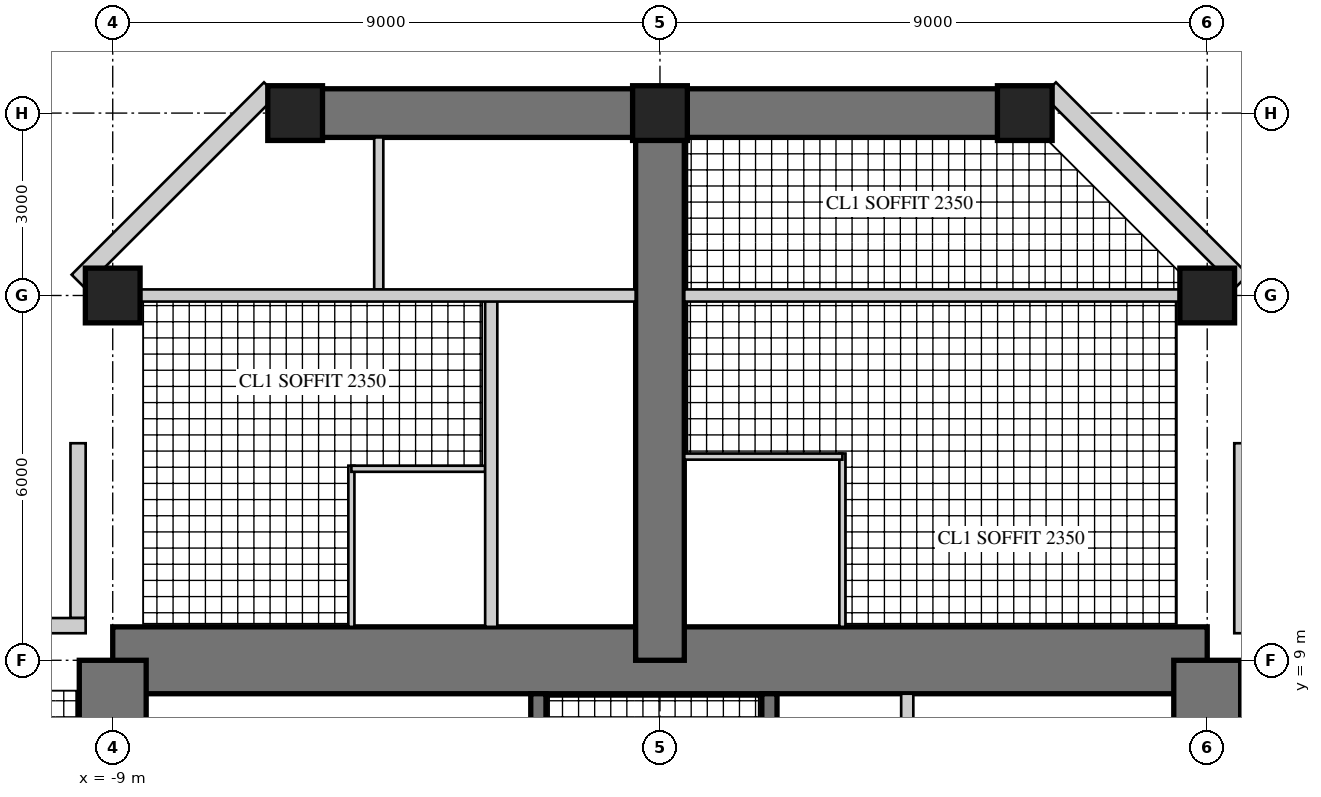
"""IFC4 building model, lengths in metres.
Left out: names, types, materials, properties, quantities, classifications, styles, units other than length and angle.
Written with IfcOpenShell. Run it as: python <this file> out.ifc"""

import sys

from ifc_helpers import new_model, si_unit, direction, frame, frame_2d, origin, origin_2d, place, context, subcontext, project, spatial, rectangle, hollow_rectangle, extrude, element, fill, save


model = new_model("IFC4")
c1 = context("Model", 3, precision=1e-05, world=origin(), true_north=direction((0.0, 1.0)))
c2 = subcontext(c1, "Body", "Model", "MODEL_VIEW")
j1 = project(units=[si_unit("LENGTHUNIT", "METRE"), si_unit("PLANEANGLEUNIT", "RADIAN")], contexts=[c1])
p1 = place(None, origin())
s1 = spatial("IfcSite", under=j1, at=p1, CompositionType="ELEMENT")
p2 = place(p1, origin())
s2 = spatial("IfcBuilding", under=s1, at=p2, CompositionType="ELEMENT")
p3 = place(p2, frame((0.0, 0.0, 172.9)))
s3 = spatial("IfcBuildingStorey", under=s2, at=p3, CompositionType="ELEMENT", Elevation=172.9)
p4 = place(p3, frame((9.0, 9.0, 0.0), z_axis=(0.0, 0.0, 1.0), x_axis=(-1.0, 0.0, 0.0)))
e1 = element("IfcWall", 1, at=p4, inside=s3, PredefinedType="SHEAR", context=c2, shape_type="SweptSolid", body=[
    extrude(rectangle(XDim=18.0, YDim=1.1, at=frame_2d((9.0, 0.0))), origin(), (0.0, 0.0, 1.0), 3.4),
])
p5 = place(p4, frame((9.8, 0.0, 0.0)))
e2 = element("IfcOpeningElement", 2, at=p5, cuts=e1, PredefinedType="OPENING", context=c2, shape_type="SweptSolid", body=[
    extrude(rectangle(XDim=1.0, YDim=2.4, at=frame_2d((0.5, 1.2))), frame((0.0, 0.56, 0.0), z_axis=(0.0, -1.0, 0.0), x_axis=(1.0, 0.0, 0.0)), (0.0, 0.0, 1.0), 1.12),
])
p6 = place(p3, frame((9.0, -9.0, 0.0), z_axis=(0.0, 0.0, 1.0), x_axis=(0.0, 1.0, 0.0)))
e3 = element("IfcWall", 3, at=p6, inside=s3, PredefinedType="SHEAR", context=c2, shape_type="SweptSolid", body=[
    extrude(rectangle(XDim=18.0, YDim=1.1, at=frame_2d((9.0, 0.0))), origin(), (0.0, 0.0, 1.0), 3.4),
])
p7 = place(p6, frame((9.8, 0.0, 0.0)))
e4 = element("IfcOpeningElement", 4, at=p7, cuts=e3, PredefinedType="OPENING", context=c2, shape_type="SweptSolid", body=[
    extrude(rectangle(XDim=1.0, YDim=2.4, at=frame_2d((0.5, 1.2))), frame((0.0, 0.56, 0.0), z_axis=(0.0, -1.0, 0.0), x_axis=(1.0, 0.0, 0.0)), (0.0, 0.0, 1.0), 1.12),
])
p8 = place(p3, frame((-9.0, 9.0, 0.0), z_axis=(0.0, 0.0, 1.0), x_axis=(0.0, -1.0, 0.0)))
e5 = element("IfcWall", 5, at=p8, inside=s3, PredefinedType="SHEAR", context=c2, shape_type="SweptSolid", body=[
    extrude(rectangle(XDim=18.0, YDim=1.1, at=frame_2d((9.0, 0.0))), origin(), (0.0, 0.0, 1.0), 3.4),
])
p9 = place(p8, frame((9.8, 0.0, 0.0)))
e6 = element("IfcOpeningElement", 6, at=p9, cuts=e5, PredefinedType="OPENING", context=c2, shape_type="SweptSolid", body=[
    extrude(rectangle(XDim=1.0, YDim=2.4, at=frame_2d((0.5, 1.2))), frame((0.0, 0.56, 0.0), z_axis=(0.0, -1.0, 0.0), x_axis=(1.0, 0.0, 0.0)), (0.0, 0.0, 1.0), 1.12),
])
p10 = place(p3, frame((1.8, 1.875, 0.0), z_axis=(0.0, 0.0, 1.0), x_axis=(0.0, 1.0, 0.0)))
e7 = element("IfcWall", 7, at=p10, inside=s3, PredefinedType="SHEAR", context=c2, shape_type="SweptSolid", body=[
    extrude(rectangle(XDim=6.575, YDim=0.25, at=frame_2d((3.288, 0.0))), origin(), (0.0, 0.0, 1.0), 3.4),
])
p11 = place(p10, frame((1.875, 0.0, 0.0)))
e8 = element("IfcOpeningElement", 8, at=p11, cuts=e7, PredefinedType="OPENING", context=c2, shape_type="SweptSolid", body=[
    extrude(rectangle(XDim=1.6, YDim=2.4, at=frame_2d((0.8, 1.2))), frame((0.0, 0.135, 0.0), z_axis=(0.0, -1.0, 0.0), x_axis=(1.0, 0.0, 0.0)), (0.0, 0.0, 1.0), 0.27),
])
p12 = place(p3, frame((4.067, 5.975, 0.0), z_axis=(0.0, 0.0, 1.0), x_axis=(0.0, 1.0, 0.0)))
e9 = element("IfcWall", 9, at=p12, inside=s3, PredefinedType="PARTITIONING", context=c2, shape_type="SweptSolid", body=[
    extrude(rectangle(XDim=2.475, YDim=0.2, at=frame_2d((1.237, 0.0))), origin(), (0.0, 0.0, 1.0), 3.4),
])
p13 = place(p3, frame((-2.0, 1.675, 0.0), z_axis=(0.0, 0.0, 1.0), x_axis=(0.0, 1.0, 0.0)))
e10 = element("IfcWall", 10, at=p13, inside=s3, PredefinedType="SHEAR", context=c2, shape_type="SweptSolid", body=[
    extrude(rectangle(XDim=6.775, YDim=0.25, at=frame_2d((3.387, 0.0))), origin(), (0.0, 0.0, 1.0), 3.4),
])
p14 = place(p13, frame((0.725, 0.0, 0.0)))
e11 = element("IfcOpeningElement", 11, at=p14, cuts=e10, PredefinedType="OPENING", context=c2, shape_type="SweptSolid", body=[
    extrude(rectangle(XDim=1.0, YDim=2.1, at=frame_2d((0.5, 1.05))), frame((0.0, 0.135, 0.0), z_axis=(0.0, -1.0, 0.0), x_axis=(1.0, 0.0, 0.0)), (0.0, 0.0, 1.0), 0.27),
])
p15 = place(p3, frame((0.0, 9.0, 0.0), z_axis=(0.0, 0.0, 1.0), x_axis=(0.0, 1.0, 0.0)))
e12 = element("IfcWall", 12, at=p15, inside=s3, PredefinedType="SHEAR", context=c2, shape_type="SweptSolid", body=[
    extrude(rectangle(XDim=9.0, YDim=0.8, at=frame_2d((4.5, 0.0))), origin(), (0.0, 0.0, 1.0), 3.4),
])
p16 = place(p15, frame((3.95, 0.0, 0.0)))
e13 = element("IfcOpeningElement", 13, at=p16, cuts=e12, PredefinedType="OPENING", context=c2, shape_type="SweptSolid", body=[
    extrude(rectangle(XDim=1.0, YDim=2.15, at=frame_2d((0.5, 1.075))), frame((0.0, 0.41, 0.0), z_axis=(0.0, -1.0, 0.0), x_axis=(1.0, 0.0, 0.0)), (0.0, 0.0, 1.0), 0.82),
])
p17 = place(p15, frame((7.0, 0.0, 0.0)))
e14 = element("IfcOpeningElement", 14, at=p17, cuts=e12, PredefinedType="OPENING", context=c2, shape_type="SweptSolid", body=[
    extrude(rectangle(XDim=1.0, YDim=2.2, at=frame_2d((0.5, 1.1))), frame((0.0, 0.41, 0.0), z_axis=(0.0, -1.0, 0.0), x_axis=(1.0, 0.0, 0.0)), (0.0, 0.0, 1.0), 0.82),
])
p18 = place(p3, frame((6.0, 18.0, 0.0), z_axis=(0.0, 0.0, 1.0), x_axis=(-1.0, 0.0, 0.0)))
e15 = element("IfcWall", 15, at=p18, inside=s3, PredefinedType="SHEAR", context=c2, shape_type="SweptSolid", body=[
    extrude(rectangle(XDim=12.0, YDim=0.8, at=frame_2d((6.0, 0.0))), origin(), (0.0, 0.0, 1.0), 3.4),
])
p19 = place(p18, frame((1.625, 0.0, 0.6)))
e16 = element("IfcOpeningElement", 16, at=p19, cuts=e15, PredefinedType="OPENING", context=c2, shape_type="SweptSolid", body=[
    extrude(rectangle(XDim=3.0, YDim=2.4, at=frame_2d((1.5, 1.2))), frame((0.0, 0.41, 0.0), z_axis=(0.0, -1.0, 0.0), x_axis=(1.0, 0.0, 0.0)), (0.0, 0.0, 1.0), 0.82),
])
p20 = place(p18, frame((7.375, 0.0, 0.6)))
e17 = element("IfcOpeningElement", 17, at=p20, cuts=e15, PredefinedType="OPENING", context=c2, shape_type="SweptSolid", body=[
    extrude(rectangle(XDim=3.0, YDim=2.4, at=frame_2d((1.5, 1.2))), frame((0.0, 0.41, 0.0), z_axis=(0.0, -1.0, 0.0), x_axis=(1.0, 0.0, 0.0)), (0.0, 0.0, 1.0), 0.82),
])
for number, where, z_axis, x_axis in (
    (18, (9.0, 15.0, 0.0), (0.0, 0.0, 1.0), (1.0, 0.0, 0.0)),
    (19, (-9.0, 15.0, 0.0), (0.0, 0.0, 1.0), (1.0, 0.0, 0.0)),
    (20, (6.0, 18.0, 0.0), (0.0, 0.0, 1.0), (1.0, 0.0, 0.0)),
    (21, (0.0, 18.0, 0.0), (0.0, 0.0, 1.0), (1.0, 0.0, 0.0)),
    (22, (-6.0, 18.0, 0.0), (0.0, 0.0, 1.0), (1.0, 0.0, 0.0)),
):
    element("IfcColumn", number, at=place(p3, frame(where, z_axis=z_axis, x_axis=x_axis)), inside=s3, PredefinedType="COLUMN", context=c2, shape_type="SweptSolid", body=[
        extrude(rectangle(XDim=0.9, YDim=0.9, at=origin_2d()), origin(), (0.0, 0.0, 1.0), 3.4),
    ])
p21 = place(p3, frame((9.57, 9.445, 0.0), z_axis=(0.0, 0.0, 1.0), x_axis=(0.0, 1.0, 0.0)))
e23 = element("IfcWall", 23, at=p21, inside=s3, PredefinedType="SOLIDWALL", context=c2, shape_type="SweptSolid", body=[
    extrude(rectangle(XDim=3.125, YDim=0.25, at=frame_2d((1.562, 0.0))), origin(), (0.0, 0.0, 1.0), 3.22),
])
p22 = place(p21, frame((0.6, 0.0, 0.0)))
e24 = element("IfcOpeningElement", 24, at=p22, cuts=e23, PredefinedType="OPENING", context=c2, shape_type="SweptSolid", body=[
    extrude(rectangle(XDim=1.0, YDim=2.2, at=frame_2d((0.5, 1.1))), frame((0.0, 0.135, 0.0), z_axis=(0.0, -1.0, 0.0), x_axis=(1.0, 0.0, 0.0)), (0.0, 0.0, 1.0), 0.27),
])
p23 = place(p3, frame((9.57, 15.236, 0.0), z_axis=(0.0, 0.0, 1.0), x_axis=(-0.707134062067, 0.707079499254, 0.0)))
e25 = element("IfcWall", 25, at=p23, inside=s3, PredefinedType="SOLIDWALL", context=c2, shape_type="SweptSolid", body=[
    extrude(rectangle(XDim=4.475, YDim=0.3, at=frame_2d((2.237, 0.0))), origin(), (0.0, 0.0, 1.0), 3.22),
])
p24 = place(p23, frame((1.787, 0.0, 0.3)))
e26 = element("IfcOpeningElement", 26, at=p24, cuts=e25, PredefinedType="OPENING", context=c2, shape_type="SweptSolid", body=[
    extrude(rectangle(XDim=0.9, YDim=2.4, at=frame_2d((0.45, 1.2))), frame((0.0, 0.16, 0.0), z_axis=(0.0, -1.0, 0.0), x_axis=(1.0, 0.0, 0.0)), (0.0, 0.0, 1.0), 0.32),
])
p25 = place(p3, frame((-6.406, 18.4, 0.0), z_axis=(0.0, 0.0, 1.0), x_axis=(-0.707134062067, -0.707079499254, 0.0)))
e27 = element("IfcWall", 27, at=p25, inside=s3, PredefinedType="SOLIDWALL", context=c2, shape_type="SweptSolid", body=[
    extrude(rectangle(XDim=4.475, YDim=0.3, at=frame_2d((2.237, 0.0))), origin(), (0.0, 0.0, 1.0), 3.22),
])
p26 = place(p25, frame((1.787, 0.0, 0.3)))
e28 = element("IfcOpeningElement", 28, at=p26, cuts=e27, PredefinedType="OPENING", context=c2, shape_type="SweptSolid", body=[
    extrude(rectangle(XDim=0.9, YDim=2.4, at=frame_2d((0.45, 1.2))), frame((0.0, 0.16, 0.0), z_axis=(0.0, -1.0, 0.0), x_axis=(1.0, 0.0, 0.0)), (0.0, 0.0, 1.0), 0.32),
])
p27 = place(p3, frame((-9.57, 12.57, 0.0), z_axis=(0.0, 0.0, 1.0), x_axis=(0.0, -1.0, 0.0)))
e29 = element("IfcWall", 29, at=p27, inside=s3, PredefinedType="SOLIDWALL", context=c2, shape_type="SweptSolid", body=[
    extrude(rectangle(XDim=2.875, YDim=0.25, at=frame_2d((1.438, 0.0))), origin(), (0.0, 0.0, 1.0), 3.22),
])
p28 = place(p27, frame((0.6, 0.0, 0.0)))
e30 = element("IfcOpeningElement", 30, at=p28, cuts=e29, PredefinedType="OPENING", context=c2, shape_type="SweptSolid", body=[
    extrude(rectangle(XDim=1.0, YDim=2.2, at=frame_2d((0.5, 1.1))), frame((0.0, 0.135, 0.0), z_axis=(0.0, -1.0, 0.0), x_axis=(1.0, 0.0, 0.0)), (0.0, 0.0, 1.0), 0.27),
])
p29 = place(p3, frame((-9.445, 9.57, 0.0), z_axis=(0.0, 0.0, 1.0), x_axis=(-1.0, 0.0, 0.0)))
e31 = element("IfcWall", 31, at=p29, inside=s3, PredefinedType="SOLIDWALL", context=c2, shape_type="SweptSolid", body=[
    extrude(rectangle(XDim=3.125, YDim=0.25, at=frame_2d((1.562, 0.0))), origin(), (0.0, 0.0, 1.0), 3.22),
])
p30 = place(p29, frame((0.6, 0.0, 0.0)))
e32 = element("IfcOpeningElement", 32, at=p30, cuts=e31, PredefinedType="OPENING", context=c2, shape_type="SweptSolid", body=[
    extrude(rectangle(XDim=1.0, YDim=2.2, at=frame_2d((0.5, 1.1))), frame((0.0, 0.135, 0.0), z_axis=(0.0, -1.0, 0.0), x_axis=(1.0, 0.0, 0.0)), (0.0, 0.0, 1.0), 0.27),
])
p31 = place(p3, frame((-5.075, 9.55, 0.0), z_axis=(0.0, 0.0, 1.0), x_axis=(0.0, 1.0, 0.0)))
e33 = element("IfcWall", 33, at=p31, inside=s3, PredefinedType="PARTITIONING", context=c2, shape_type="SweptSolid", body=[
    extrude(rectangle(XDim=2.65, YDim=0.1, at=frame_2d((1.325, 0.0))), origin(), (0.0, 0.0, 1.0), 3.22),
])
p32 = place(p3, frame((-2.875, 12.15, 0.0), z_axis=(0.0, 0.0, 1.0), x_axis=(-1.0, 0.0, 0.0)))
e34 = element("IfcWall", 34, at=p32, inside=s3, PredefinedType="PARTITIONING", context=c2, shape_type="SweptSolid", body=[
    extrude(rectangle(XDim=2.2, YDim=0.1, at=frame_2d((1.1, 0.0))), origin(), (0.0, 0.0, 1.0), 3.22),
])
p33 = place(p32, frame((0.55, 0.0, 0.0)))
e35 = element("IfcOpeningElement", 35, at=p33, cuts=e34, PredefinedType="OPENING", context=c2, shape_type="SweptSolid", body=[
    extrude(rectangle(XDim=0.9, YDim=2.1, at=frame_2d((0.45, 1.05))), frame((0.0, 0.06, 0.0), z_axis=(0.0, -1.0, 0.0), x_axis=(1.0, 0.0, 0.0)), (0.0, 0.0, 1.0), 0.12),
])
p34 = place(p3, frame((3.0, 9.55, 0.0), z_axis=(0.0, 0.0, 1.0), x_axis=(0.0, 1.0, 0.0)))
e36 = element("IfcWall", 36, at=p34, inside=s3, PredefinedType="PARTITIONING", context=c2, shape_type="SweptSolid", body=[
    extrude(rectangle(XDim=2.85, YDim=0.1, at=frame_2d((1.425, 0.0))), origin(), (0.0, 0.0, 1.0), 3.22),
])
p35 = place(p3, frame((3.0, 12.35, 0.0), z_axis=(0.0, 0.0, 1.0), x_axis=(-1.0, 0.0, 0.0)))
e37 = element("IfcWall", 37, at=p35, inside=s3, PredefinedType="PARTITIONING", context=c2, shape_type="SweptSolid", body=[
    extrude(rectangle(XDim=2.6, YDim=0.1, at=frame_2d((1.3, 0.0))), origin(), (0.0, 0.0, 1.0), 3.22),
])
p36 = place(p35, frame((0.55, 0.0, 0.0)))
e38 = element("IfcOpeningElement", 38, at=p36, cuts=e37, PredefinedType="OPENING", context=c2, shape_type="SweptSolid", body=[
    extrude(rectangle(XDim=0.9, YDim=2.1, at=frame_2d((0.45, 1.05))), frame((0.0, 0.06, 0.0), z_axis=(0.0, -1.0, 0.0), x_axis=(1.0, 0.0, 0.0)), (0.0, 0.0, 1.0), 0.12),
])
p37 = place(p3, frame((-2.775, 9.55, 0.0), z_axis=(0.0, 0.0, 1.0), x_axis=(0.0, 1.0, 0.0)))
e39 = element("IfcWall", 39, at=p37, inside=s3, PredefinedType="SOLIDWALL", context=c2, shape_type="SweptSolid", body=[
    extrude(rectangle(XDim=5.45, YDim=0.2, at=frame_2d((2.725, 0.0))), origin(), (0.0, 0.0, 1.0), 3.22),
])
p38 = place(p37, frame((3.4, 0.0, 0.0)))
e40 = element("IfcOpeningElement", 40, at=p38, cuts=e39, PredefinedType="OPENING", context=c2, shape_type="SweptSolid", body=[
    extrude(rectangle(XDim=1.0, YDim=2.15, at=frame_2d((0.5, 1.075))), frame((0.0, 0.11, 0.0), z_axis=(0.0, -1.0, 0.0), x_axis=(1.0, 0.0, 0.0)), (0.0, 0.0, 1.0), 0.22),
])
p39 = place(p3, frame((-4.625, 15.1, 0.0), z_axis=(0.0, 0.0, 1.0), x_axis=(0.0, 1.0, 0.0)))
e41 = element("IfcWall", 41, at=p39, inside=s3, PredefinedType="PARTITIONING", context=c2, shape_type="SweptSolid", body=[
    extrude(rectangle(XDim=2.5, YDim=0.15, at=frame_2d((1.25, 0.0))), origin(), (0.0, 0.0, 1.0), 3.22),
])
p40 = place(p39, frame((0.6, 0.0, 0.0)))
e42 = element("IfcOpeningElement", 42, at=p40, cuts=e41, PredefinedType="OPENING", context=c2, shape_type="SweptSolid", body=[
    extrude(rectangle(XDim=1.0, YDim=2.1, at=frame_2d((0.5, 1.05))), frame((0.0, 0.085, 0.0), z_axis=(0.0, -1.0, 0.0), x_axis=(1.0, 0.0, 0.0)), (0.0, 0.0, 1.0), 0.17),
])
p41 = place(p3, frame((8.55, 15.0, 0.0), z_axis=(0.0, 0.0, 1.0), x_axis=(-1.0, 0.0, 0.0)))
e43 = element("IfcWall", 43, at=p41, inside=s3, PredefinedType="SOLIDWALL", context=c2, shape_type="SweptSolid", body=[
    extrude(rectangle(XDim=8.15, YDim=0.2, at=frame_2d((4.075, 0.0))), origin(), (0.0, 0.0, 1.0), 2.47),
])
p42 = place(p3, frame((-0.4, 15.0, 0.0), z_axis=(0.0, 0.0, 1.0), x_axis=(-1.0, 0.0, 0.0)))
e44 = element("IfcWall", 44, at=p42, inside=s3, PredefinedType="SOLIDWALL", context=c2, shape_type="SweptSolid", body=[
    extrude(rectangle(XDim=8.15, YDim=0.2, at=frame_2d((4.075, 0.0))), origin(), (0.0, 0.0, 1.0), 2.47),
])
p43 = place(p42, frame((0.4, 0.0, 0.0)))
e45 = element("IfcOpeningElement", 45, at=p43, cuts=e44, PredefinedType="OPENING", context=c2, shape_type="SweptSolid", body=[
    extrude(rectangle(XDim=1.0, YDim=2.2, at=frame_2d((0.5, 1.1))), frame((0.0, 0.11, 0.0), z_axis=(0.0, -1.0, 0.0), x_axis=(1.0, 0.0, 0.0)), (0.0, 0.0, 1.0), 0.22),
])
p44 = place(p22, origin())
e46 = element("IfcDoor", 46, at=p44, inside=s3, OperationType="SINGLE_SWING_LEFT", PredefinedType="DOOR", context=c2, shape_type="SweptSolid", body=[
    extrude(hollow_rectangle(XDim=1.0, YDim=2.2, WallThickness=0.06, at=frame_2d((0.5, 1.1))), frame((0.0, 0.025, 0.0), z_axis=(0.0, -1.0, 0.0), x_axis=(1.0, 0.0, 0.0)), (0.0, 0.0, 1.0), 0.05),
    extrude(rectangle(XDim=0.879, YDim=2.079, at=frame_2d((0.5, 1.1))), frame((0.0, 0.025, 0.0), z_axis=(0.0, -1.0, 0.0), x_axis=(1.0, 0.0, 0.0)), (0.0, 0.0, 1.0), 0.05),
])
fill(e24, e46)
p45 = place(p24, origin())
e47 = element("IfcWindow", 47, at=p45, inside=s3, PartitioningType="SINGLE_PANEL", PredefinedType="WINDOW", context=c2, shape_type="SweptSolid", body=[
    extrude(hollow_rectangle(XDim=0.9, YDim=2.4, WallThickness=0.06, at=frame_2d((0.45, 1.2))), frame((0.0, 0.03, 0.0), z_axis=(0.0, -1.0, 0.0), x_axis=(1.0, 0.0, 0.0)), (0.0, 0.0, 1.0), 0.06),
    extrude(rectangle(XDim=0.779, YDim=2.279, at=frame_2d((0.45, 1.2))), frame((0.0, 0.03, 0.0), z_axis=(0.0, -1.0, 0.0), x_axis=(1.0, 0.0, 0.0)), (0.0, 0.0, 1.0), 0.06),
])
fill(e26, e47)
p46 = place(p19, origin())
e48 = element("IfcWindow", 48, at=p46, inside=s3, PartitioningType="SINGLE_PANEL", PredefinedType="WINDOW", context=c2, shape_type="SweptSolid", body=[
    extrude(hollow_rectangle(XDim=3.0, YDim=2.4, WallThickness=0.06, at=frame_2d((1.5, 1.2))), frame((0.0, 0.03, 0.0), z_axis=(0.0, -1.0, 0.0), x_axis=(1.0, 0.0, 0.0)), (0.0, 0.0, 1.0), 0.06),
    extrude(rectangle(XDim=2.879, YDim=2.279, at=frame_2d((1.5, 1.2))), frame((0.0, 0.03, 0.0), z_axis=(0.0, -1.0, 0.0), x_axis=(1.0, 0.0, 0.0)), (0.0, 0.0, 1.0), 0.06),
])
fill(e16, e48)
p47 = place(p20, origin())
e49 = element("IfcWindow", 49, at=p47, inside=s3, PartitioningType="SINGLE_PANEL", PredefinedType="WINDOW", context=c2, shape_type="SweptSolid", body=[
    extrude(hollow_rectangle(XDim=3.0, YDim=2.4, WallThickness=0.06, at=frame_2d((1.5, 1.2))), frame((0.0, 0.03, 0.0), z_axis=(0.0, -1.0, 0.0), x_axis=(1.0, 0.0, 0.0)), (0.0, 0.0, 1.0), 0.06),
    extrude(rectangle(XDim=2.879, YDim=2.279, at=frame_2d((1.5, 1.2))), frame((0.0, 0.03, 0.0), z_axis=(0.0, -1.0, 0.0), x_axis=(1.0, 0.0, 0.0)), (0.0, 0.0, 1.0), 0.06),
])
fill(e17, e49)
p48 = place(p26, origin())
e50 = element("IfcWindow", 50, at=p48, inside=s3, PartitioningType="SINGLE_PANEL", PredefinedType="WINDOW", context=c2, shape_type="SweptSolid", body=[
    extrude(hollow_rectangle(XDim=0.9, YDim=2.4, WallThickness=0.06, at=frame_2d((0.45, 1.2))), frame((0.0, 0.03, 0.0), z_axis=(0.0, -1.0, 0.0), x_axis=(1.0, 0.0, 0.0)), (0.0, 0.0, 1.0), 0.06),
    extrude(rectangle(XDim=0.779, YDim=2.279, at=frame_2d((0.45, 1.2))), frame((0.0, 0.03, 0.0), z_axis=(0.0, -1.0, 0.0), x_axis=(1.0, 0.0, 0.0)), (0.0, 0.0, 1.0), 0.06),
])
fill(e28, e50)
p49 = place(p28, origin())
e51 = element("IfcDoor", 51, at=p49, inside=s3, OperationType="SINGLE_SWING_RIGHT", PredefinedType="DOOR", context=c2, shape_type="SweptSolid", body=[
    extrude(hollow_rectangle(XDim=1.0, YDim=2.2, WallThickness=0.06, at=frame_2d((0.5, 1.1))), frame((0.0, 0.025, 0.0), z_axis=(0.0, -1.0, 0.0), x_axis=(1.0, 0.0, 0.0)), (0.0, 0.0, 1.0), 0.05),
    extrude(rectangle(XDim=0.879, YDim=2.079, at=frame_2d((0.5, 1.1))), frame((0.0, 0.025, 0.0), z_axis=(0.0, -1.0, 0.0), x_axis=(1.0, 0.0, 0.0)), (0.0, 0.0, 1.0), 0.05),
])
fill(e30, e51)
p50 = place(p33, origin())
e52 = element("IfcDoor", 52, at=p50, inside=s3, OperationType="SINGLE_SWING_LEFT", PredefinedType="DOOR", context=c2, shape_type="SweptSolid", body=[
    extrude(rectangle(XDim=0.9, YDim=2.1, at=frame_2d((0.45, 1.05))), frame((0.0, 0.025, 0.0), z_axis=(0.0, -1.0, 0.0), x_axis=(1.0, 0.0, 0.0)), (0.0, 0.0, 1.0), 0.05),
])
fill(e35, e52)
p51 = place(p36, origin())
e53 = element("IfcDoor", 53, at=p51, inside=s3, OperationType="SINGLE_SWING_LEFT", PredefinedType="DOOR", context=c2, shape_type="SweptSolid", body=[
    extrude(rectangle(XDim=0.9, YDim=2.1, at=frame_2d((0.45, 1.05))), frame((0.0, 0.025, 0.0), z_axis=(0.0, -1.0, 0.0), x_axis=(1.0, 0.0, 0.0)), (0.0, 0.0, 1.0), 0.05),
])
fill(e38, e53)
p52 = place(p38, origin())
e54 = element("IfcDoor", 54, at=p52, inside=s3, OperationType="SINGLE_SWING_LEFT", PredefinedType="DOOR", context=c2, shape_type="SweptSolid", body=[
    extrude(rectangle(XDim=1.0, YDim=2.15, at=frame_2d((0.5, 1.075))), frame((0.0, 0.025, 0.0), z_axis=(0.0, -1.0, 0.0), x_axis=(1.0, 0.0, 0.0)), (0.0, 0.0, 1.0), 0.05),
])
fill(e40, e54)
p53 = place(p40, origin())
e55 = element("IfcDoor", 55, at=p53, inside=s3, OperationType="SINGLE_SWING_LEFT", PredefinedType="DOOR", context=c2, shape_type="SweptSolid", body=[
    extrude(rectangle(XDim=1.0, YDim=2.1, at=frame_2d((0.5, 1.05))), frame((0.0, 0.025, 0.0), z_axis=(0.0, -1.0, 0.0), x_axis=(1.0, 0.0, 0.0)), (0.0, 0.0, 1.0), 0.05),
])
fill(e42, e55)
p54 = place(p43, frame((1.0, 0.0, 0.0), z_axis=(0.0, 0.0, 1.0), x_axis=(-1.0, 0.0, 0.0)))
e56 = element("IfcDoor", 56, at=p54, inside=s3, OperationType="SINGLE_SWING_RIGHT", PredefinedType="DOOR", context=c2, shape_type="SweptSolid", body=[
    extrude(rectangle(XDim=1.0, YDim=2.2, at=frame_2d((0.5, 1.1))), frame((0.0, 0.025, 0.0), z_axis=(0.0, -1.0, 0.0), x_axis=(1.0, 0.0, 0.0)), (0.0, 0.0, 1.0), 0.05),
])
fill(e45, e56)
p55 = place(p16, frame((1.0, 0.0, 0.0), z_axis=(0.0, 0.0, 1.0), x_axis=(-1.0, 0.0, 0.0)))
e57 = element("IfcDoor", 57, at=p55, inside=s3, OperationType="SINGLE_SWING_RIGHT", PredefinedType="DOOR", context=c2, shape_type="SweptSolid", body=[
    extrude(rectangle(XDim=1.0, YDim=2.15, at=frame_2d((0.5, 1.075))), frame((0.0, 0.025, 0.0), z_axis=(0.0, -1.0, 0.0), x_axis=(1.0, 0.0, 0.0)), (0.0, 0.0, 1.0), 0.05),
])
fill(e13, e57)
p56 = place(p17, origin())
e58 = element("IfcDoor", 58, at=p56, inside=s3, OperationType="SINGLE_SWING_RIGHT", PredefinedType="DOOR", context=c2, shape_type="SweptSolid", body=[
    extrude(rectangle(XDim=1.0, YDim=2.2, at=frame_2d((0.5, 1.1))), frame((0.0, 0.025, 0.0), z_axis=(0.0, -1.0, 0.0), x_axis=(1.0, 0.0, 0.0)), (0.0, 0.0, 1.0), 0.05),
])
fill(e14, e58)
p57 = place(p5, origin())
e59 = element("IfcDoor", 59, at=p57, inside=s3, OperationType="SINGLE_SWING_RIGHT", PredefinedType="DOOR", context=c2, shape_type="SweptSolid", body=[
    extrude(rectangle(XDim=1.0, YDim=2.4, at=frame_2d((0.5, 1.2))), frame((0.0, 0.055, 0.0), z_axis=(0.0, -1.0, 0.0), x_axis=(1.0, 0.0, 0.0)), (0.0, 0.0, 1.0), 0.05),
])
fill(e2, e59)
save(model, sys.argv[1])
